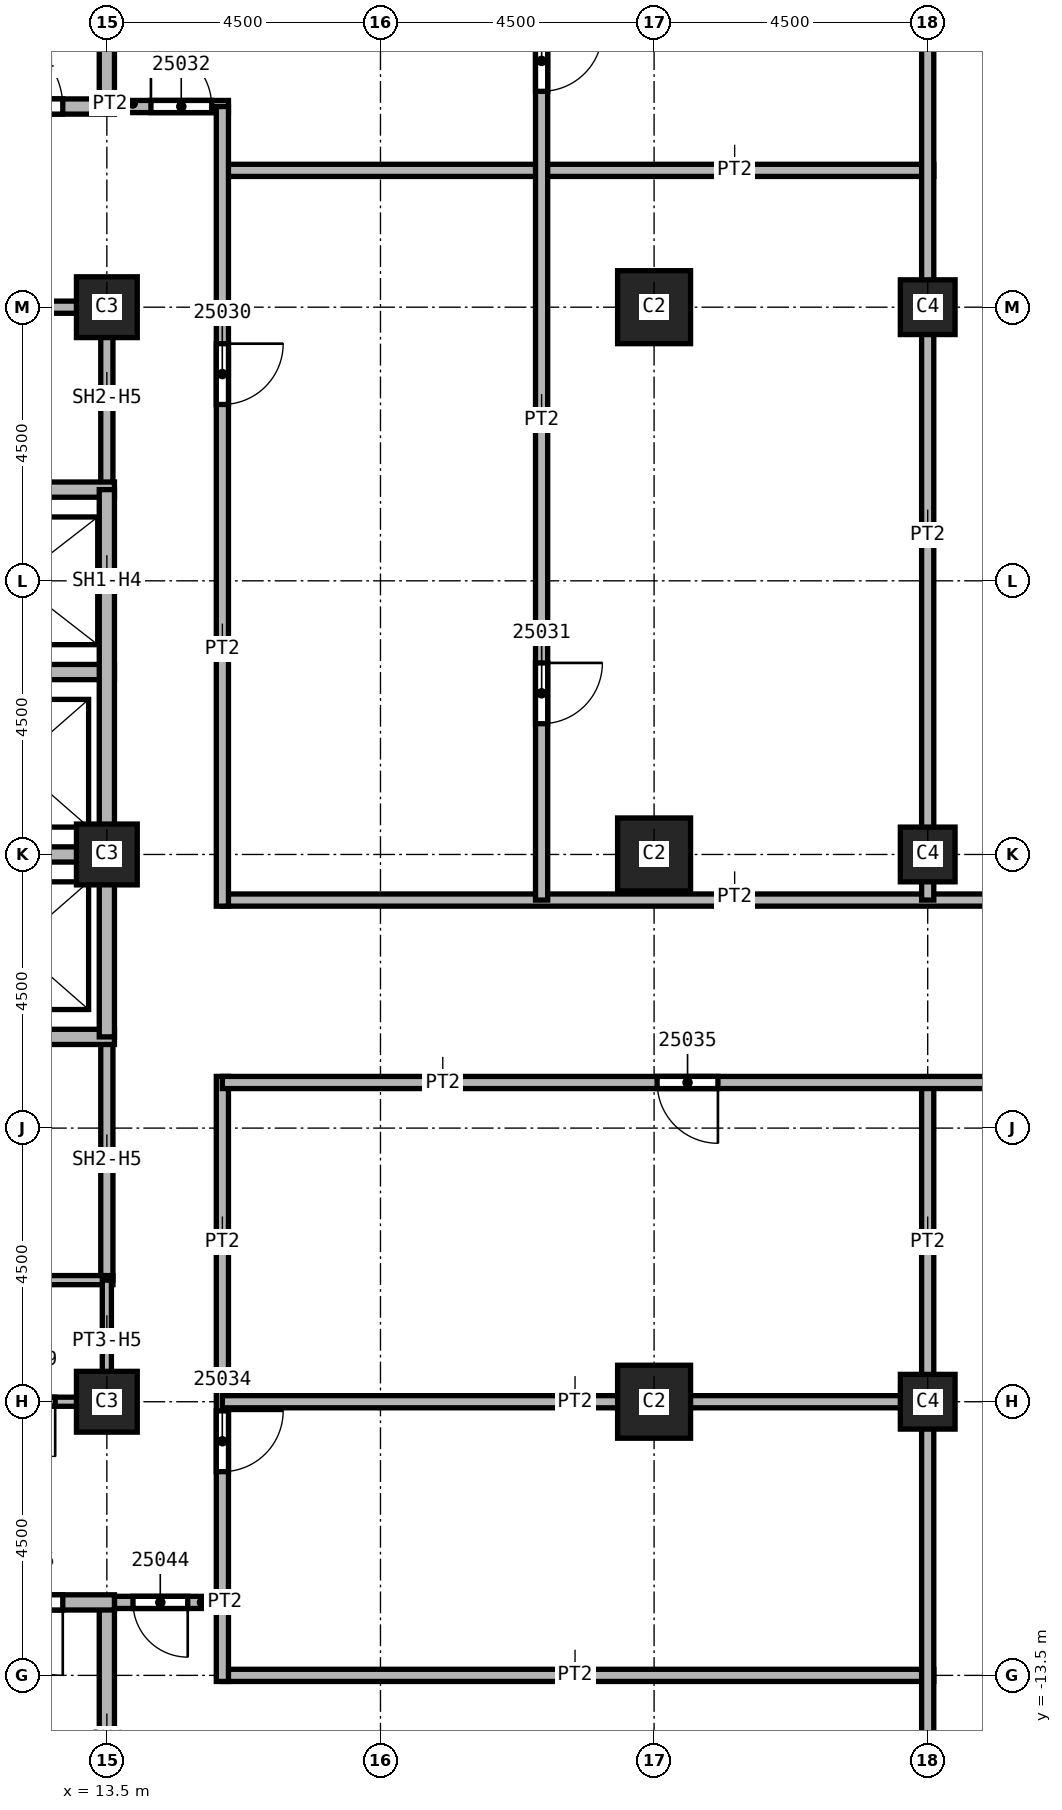
"""IFC4 building model, lengths in metres.
Left out: names, types, materials, properties, quantities, classifications, styles, units other than length and angle.
Written with IfcOpenShell. Run it as: python <this file> out.ifc"""

import sys

from ifc_helpers import new_model, si_unit, direction, frame, frame_2d, origin, origin_2d, place, context, subcontext, project, spatial, rectangle, extrude, element, fill, save


model = new_model("IFC4")
c1 = context("Model", 3, precision=1e-05, world=origin(), true_north=direction((0.0, 1.0)))
c2 = subcontext(c1, "Body", "Model", "MODEL_VIEW")
j1 = project(units=[si_unit("LENGTHUNIT", "METRE"), si_unit("PLANEANGLEUNIT", "RADIAN")], contexts=[c1])
p1 = place(None, origin())
s1 = spatial("IfcSite", under=j1, at=p1, CompositionType="ELEMENT")
p2 = place(p1, origin())
s2 = spatial("IfcBuilding", under=s1, at=p2, CompositionType="ELEMENT")
p3 = place(p2, frame((0.0, 0.0, 60.0)))
s3 = spatial("IfcBuildingStorey", under=s2, at=p3, CompositionType="ELEMENT", Elevation=60.0)
for number, where, z_axis, x_axis in (
    (1, (22.5, 0.0, 0.0), (0.0, 0.0, 1.0), (1.0, 0.0, 0.0)),
    (2, (22.5, 9.0, 0.0), (0.0, 0.0, 1.0), (1.0, 0.0, 0.0)),
    (3, (22.5, -9.0, 0.0), (0.0, 0.0, 1.0), (1.0, 0.0, 0.0)),
):
    element("IfcColumn", number, at=place(p3, frame(where, z_axis=z_axis, x_axis=x_axis)), inside=s3, PredefinedType="COLUMN", context=c2, shape_type="SweptSolid", body=[
        extrude(rectangle(XDim=1.2, YDim=1.2, at=origin_2d()), origin(), (0.0, 0.0, 1.0), 7.7),
    ])
for number, where, z_axis, x_axis in (
    (4, (13.5, 0.0, 0.0), (0.0, 0.0, 1.0), (1.0, 0.0, 0.0)),
    (5, (13.5, 9.0, 0.0), (0.0, 0.0, 1.0), (1.0, 0.0, 0.0)),
    (6, (13.5, -9.0, 0.0), (0.0, 0.0, 1.0), (1.0, 0.0, 0.0)),
):
    element("IfcColumn", number, at=place(p3, frame(where, z_axis=z_axis, x_axis=x_axis)), inside=s3, PredefinedType="COLUMN", context=c2, shape_type="SweptSolid", body=[
        extrude(rectangle(XDim=1.0, YDim=1.0, at=origin_2d()), origin(), (0.0, 0.0, 1.0), 7.7),
    ])
for number, where, z_axis, x_axis in (
    (7, (27.0, 0.0, 0.0), (0.0, 0.0, 1.0), (1.0, 0.0, 0.0)),
    (8, (27.0, 9.0, 0.0), (0.0, 0.0, 1.0), (1.0, 0.0, 0.0)),
    (9, (27.0, -9.0, 0.0), (0.0, 0.0, 1.0), (1.0, 0.0, 0.0)),
):
    element("IfcColumn", number, at=place(p3, frame(where, z_axis=z_axis, x_axis=x_axis)), inside=s3, PredefinedType="COLUMN", context=c2, shape_type="SweptSolid", body=[
        extrude(rectangle(XDim=0.9, YDim=0.9, at=origin_2d()), origin(), (0.0, 0.0, 1.0), 7.7),
    ])
p4 = place(p3, frame((13.375, 12.3, 0.0), z_axis=(0.0, 0.0, 1.0), x_axis=(1.0, 0.0, 0.0)))
e10 = element("IfcWall", 10, at=p4, inside=s3, PredefinedType="PARTITIONING", context=c2, shape_type="SweptSolid", body=[
    extrude(rectangle(XDim=2.125, YDim=0.2, at=frame_2d((1.062, 0.0))), origin(), (0.0, 0.0, 1.0), 7.7),
])
p5 = place(p4, frame((0.85, 0.0, 0.0)))
e11 = element("IfcOpeningElement", 11, at=p5, cuts=e10, PredefinedType="OPENING", context=c2, shape_type="SweptSolid", body=[
    extrude(rectangle(XDim=1.0, YDim=2.1, at=frame_2d((0.5, 1.05))), frame((0.0, 0.1, 0.0), z_axis=(0.0, -1.0, 0.0), x_axis=(1.0, 0.0, 0.0)), (0.0, 0.0, 1.0), 0.2),
])
p6 = place(p3, frame((15.4, -13.5, 0.0), z_axis=(0.0, 0.0, 1.0), x_axis=(1.0, 0.0, 0.0)))
e12 = element("IfcWall", 12, at=p6, inside=s3, PredefinedType="PARTITIONING", context=c2, shape_type="SweptSolid", body=[
    extrude(rectangle(XDim=11.7, YDim=0.2, at=frame_2d((5.85, 0.0))), origin(), (0.0, 0.0, 1.0), 7.7),
])
p7 = place(p3, frame((15.4, -3.65, 0.0), z_axis=(0.0, 0.0, 1.0), x_axis=(0.0, -1.0, 0.0)))
e13 = element("IfcWall", 13, at=p7, inside=s3, PredefinedType="PARTITIONING", context=c2, shape_type="SweptSolid", body=[
    extrude(rectangle(XDim=9.95, YDim=0.2, at=frame_2d((4.975, 0.0))), origin(), (0.0, 0.0, 1.0), 7.7),
])
p8 = place(p7, frame((5.5, 0.0, 0.0)))
e14 = element("IfcOpeningElement", 14, at=p8, cuts=e13, PredefinedType="OPENING", context=c2, shape_type="SweptSolid", body=[
    extrude(rectangle(XDim=1.0, YDim=2.1, at=frame_2d((0.5, 1.05))), frame((0.0, 0.1, 0.0), z_axis=(0.0, -1.0, 0.0), x_axis=(1.0, 0.0, 0.0)), (0.0, 0.0, 1.0), 0.2),
])
p9 = place(p3, frame((15.4, -9.0, 0.0), z_axis=(0.0, 0.0, 1.0), x_axis=(1.0, 0.0, 0.0)))
e15 = element("IfcWall", 15, at=p9, inside=s3, PredefinedType="PARTITIONING", context=c2, shape_type="SweptSolid", body=[
    extrude(rectangle(XDim=11.7, YDim=0.2, at=frame_2d((5.85, 0.0))), origin(), (0.0, 0.0, 1.0), 7.7),
])
p10 = place(p3, frame((15.4, -0.75, 0.0), z_axis=(0.0, 0.0, 1.0), x_axis=(1.0, 0.0, 0.0)))
e16 = element("IfcWall", 16, at=p10, inside=s3, PredefinedType="PARTITIONING", context=c2, shape_type="SweptSolid", body=[
    extrude(rectangle(XDim=20.725, YDim=0.2, at=frame_2d((10.363, 0.0))), origin(), (0.0, 0.0, 1.0), 7.7),
])
p11 = place(p10, frame((12.65, 0.0, 0.0)))
e17 = element("IfcOpeningElement", 17, at=p11, cuts=e16, PredefinedType="OPENING", context=c2, shape_type="SweptSolid", body=[
    extrude(rectangle(XDim=1.0, YDim=2.1, at=frame_2d((0.5, 1.05))), frame((0.0, 0.1, 0.0), z_axis=(0.0, -1.0, 0.0), x_axis=(1.0, 0.0, 0.0)), (0.0, 0.0, 1.0), 0.2),
])
p12 = place(p10, frame((16.7, 0.0, 0.0)))
e18 = element("IfcOpeningElement", 18, at=p12, cuts=e16, PredefinedType="OPENING", context=c2, shape_type="SweptSolid", body=[
    extrude(rectangle(XDim=1.0, YDim=2.1, at=frame_2d((0.5, 1.05))), frame((0.0, 0.1, 0.0), z_axis=(0.0, -1.0, 0.0), x_axis=(1.0, 0.0, 0.0)), (0.0, 0.0, 1.0), 0.2),
])
p13 = place(p3, frame((15.4, 11.25, 0.0), z_axis=(0.0, 0.0, 1.0), x_axis=(1.0, 0.0, 0.0)))
e19 = element("IfcWall", 19, at=p13, inside=s3, PredefinedType="PARTITIONING", context=c2, shape_type="SweptSolid", body=[
    extrude(rectangle(XDim=11.7, YDim=0.2, at=frame_2d((5.85, 0.0))), origin(), (0.0, 0.0, 1.0), 7.7),
])
p14 = place(p3, frame((15.4, 12.3, 0.0), z_axis=(0.0, 0.0, 1.0), x_axis=(0.0, -1.0, 0.0)))
e20 = element("IfcWall", 20, at=p14, inside=s3, PredefinedType="PARTITIONING", context=c2, shape_type="SweptSolid", body=[
    extrude(rectangle(XDim=13.15, YDim=0.2, at=frame_2d((6.575, 0.0))), origin(), (0.0, 0.0, 1.0), 7.7),
])
p15 = place(p14, frame((3.9, 0.0, 0.0)))
e21 = element("IfcOpeningElement", 21, at=p15, cuts=e20, PredefinedType="OPENING", context=c2, shape_type="SweptSolid", body=[
    extrude(rectangle(XDim=1.0, YDim=2.1, at=frame_2d((0.5, 1.05))), frame((0.0, 0.1, 0.0), z_axis=(0.0, -1.0, 0.0), x_axis=(1.0, 0.0, 0.0)), (0.0, 0.0, 1.0), 0.2),
])
p16 = place(p3, frame((15.5, -12.3, 0.0), z_axis=(0.0, 0.0, 1.0), x_axis=(-1.0, 0.0, 0.0)))
e22 = element("IfcWall", 22, at=p16, inside=s3, PredefinedType="PARTITIONING", context=c2, shape_type="SweptSolid", body=[
    extrude(rectangle(XDim=2.125, YDim=0.2, at=frame_2d((1.062, 0.0))), origin(), (0.0, 0.0, 1.0), 7.7),
])
p17 = place(p16, frame((0.67, 0.0, 0.0)))
e23 = element("IfcOpeningElement", 23, at=p17, cuts=e22, PredefinedType="OPENING", context=c2, shape_type="SweptSolid", body=[
    extrude(rectangle(XDim=0.9, YDim=2.1, at=frame_2d((0.45, 1.05))), frame((0.0, 0.1, 0.0), z_axis=(0.0, -1.0, 0.0), x_axis=(1.0, 0.0, 0.0)), (0.0, 0.0, 1.0), 0.2),
])
p18 = place(p3, frame((20.65, 16.8, 0.0), z_axis=(0.0, 0.0, 1.0), x_axis=(0.0, -1.0, 0.0)))
e24 = element("IfcWall", 24, at=p18, inside=s3, PredefinedType="PARTITIONING", context=c2, shape_type="SweptSolid", body=[
    extrude(rectangle(XDim=17.55, YDim=0.2, at=frame_2d((8.775, 0.0))), origin(), (0.0, 0.0, 1.0), 7.7),
])
p19 = place(p18, frame((13.65, 0.0, 0.0)))
e25 = element("IfcOpeningElement", 25, at=p19, cuts=e24, PredefinedType="OPENING", context=c2, shape_type="SweptSolid", body=[
    extrude(rectangle(XDim=1.0, YDim=2.1, at=frame_2d((0.5, 1.05))), frame((0.0, 0.1, 0.0), z_axis=(0.0, -1.0, 0.0), x_axis=(1.0, 0.0, 0.0)), (0.0, 0.0, 1.0), 0.2),
])
p20 = place(p18, frame((3.25, 0.0, 0.0)))
e26 = element("IfcOpeningElement", 26, at=p20, cuts=e24, PredefinedType="OPENING", context=c2, shape_type="SweptSolid", body=[
    extrude(rectangle(XDim=1.0, YDim=2.1, at=frame_2d((0.5, 1.05))), frame((0.0, 0.1, 0.0), z_axis=(0.0, -1.0, 0.0), x_axis=(1.0, 0.0, 0.0)), (0.0, 0.0, 1.0), 0.2),
])
p21 = place(p3, frame((27.0, -3.75, 0.0), z_axis=(0.0, 0.0, 1.0), x_axis=(0.0, -1.0, 0.0)))
e27 = element("IfcWall", 27, at=p21, inside=s3, PredefinedType="PARTITIONING", context=c2, shape_type="SweptSolid", body=[
    extrude(rectangle(XDim=12.0, YDim=0.2, at=frame_2d((6.0, 0.0))), origin(), (0.0, 0.0, 1.0), 7.7),
])
p22 = place(p3, frame((27.0, 15.9, 0.0), z_axis=(0.0, 0.0, 1.0), x_axis=(0.0, -1.0, 0.0)))
e28 = element("IfcWall", 28, at=p22, inside=s3, PredefinedType="PARTITIONING", context=c2, shape_type="SweptSolid", body=[
    extrude(rectangle(XDim=16.65, YDim=0.2, at=frame_2d((8.325, 0.0))), origin(), (0.0, 0.0, 1.0), 7.7),
])
p23 = place(p3, frame((36.125, -3.75, 0.0), z_axis=(0.0, 0.0, 1.0), x_axis=(-1.0, 0.0, 0.0)))
e29 = element("IfcWall", 29, at=p23, inside=s3, PredefinedType="PARTITIONING", context=c2, shape_type="SweptSolid", body=[
    extrude(rectangle(XDim=20.725, YDim=0.2, at=frame_2d((10.363, 0.0))), origin(), (0.0, 0.0, 1.0), 7.7),
])
p24 = place(p23, frame((12.575, 0.0, 0.0)))
e30 = element("IfcOpeningElement", 30, at=p24, cuts=e29, PredefinedType="OPENING", context=c2, shape_type="SweptSolid", body=[
    extrude(rectangle(XDim=1.0, YDim=2.1, at=frame_2d((0.5, 1.05))), frame((0.0, 0.1, 0.0), z_axis=(0.0, -1.0, 0.0), x_axis=(1.0, 0.0, 0.0)), (0.0, 0.0, 1.0), 0.2),
])
p25 = place(p23, frame((5.525, 0.0, 0.0)))
e31 = element("IfcOpeningElement", 31, at=p25, cuts=e29, PredefinedType="OPENING", context=c2, shape_type="SweptSolid", body=[
    extrude(rectangle(XDim=1.0, YDim=2.1, at=frame_2d((0.5, 1.05))), frame((0.0, 0.1, 0.0), z_axis=(0.0, -1.0, 0.0), x_axis=(1.0, 0.0, 0.0)), (0.0, 0.0, 1.0), 0.2),
])
p26 = place(p23, frame((0.25, 0.0, 0.0)))
e32 = element("IfcOpeningElement", 32, at=p26, cuts=e29, PredefinedType="OPENING", context=c2, shape_type="SweptSolid", body=[
    extrude(rectangle(XDim=1.0, YDim=2.1, at=frame_2d((0.5, 1.05))), frame((0.0, 0.1, 0.0), z_axis=(0.0, -1.0, 0.0), x_axis=(1.0, 0.0, 0.0)), (0.0, 0.0, 1.0), 0.2),
])
p27 = place(p3, frame((10.5, 9.0, 0.0), z_axis=(0.0, 0.0, 1.0), x_axis=(1.0, 0.0, 0.0)))
e33 = element("IfcWall", 33, at=p27, inside=s3, PredefinedType="SOLIDWALL", context=c2, shape_type="SweptSolid", body=[
    extrude(rectangle(XDim=3.0, YDim=0.2, at=frame_2d((1.5, 0.0))), origin(), (0.0, 0.0, 1.0), 6.938),
])
p28 = place(p3, frame((13.5, -3.0, 0.0), z_axis=(0.0, 0.0, 1.0), x_axis=(0.0, -1.0, 0.0)))
e34 = element("IfcWall", 34, at=p28, inside=s3, PredefinedType="SOLIDWALL", context=c2, shape_type="SweptSolid", body=[
    extrude(rectangle(XDim=4.0, YDim=0.2, at=frame_2d((2.0, 0.0))), origin(), (0.0, 0.0, 1.0), 6.938),
])
p29 = place(p3, frame((13.5, 9.1, 0.0), z_axis=(0.0, 0.0, 1.0), x_axis=(0.0, -1.0, 0.0)))
e35 = element("IfcWall", 35, at=p29, inside=s3, PredefinedType="SOLIDWALL", context=c2, shape_type="SweptSolid", body=[
    extrude(rectangle(XDim=3.1, YDim=0.2, at=frame_2d((1.55, 0.0))), origin(), (0.0, 0.0, 1.0), 6.938),
])
p30 = place(p3, frame((4.375, 3.0, 0.0), z_axis=(0.0, 0.0, 1.0), x_axis=(1.0, 0.0, 0.0)))
e36 = element("IfcWall", 36, at=p30, inside=s3, PredefinedType="SOLIDWALL", context=c2, shape_type="SweptSolid", body=[
    extrude(rectangle(XDim=9.25, YDim=0.25, at=frame_2d((4.625, 0.0))), origin(), (0.0, 0.0, 1.0), 7.7),
])
p31 = place(p30, frame((4.875, 0.0, 0.0)))
e37 = element("IfcOpeningElement", 37, at=p31, cuts=e36, PredefinedType="OPENING", context=c2, shape_type="SweptSolid", body=[
    extrude(rectangle(XDim=1.1, YDim=2.1, at=frame_2d((0.55, 1.05))), frame((0.0, 0.125, 0.0), z_axis=(0.0, -1.0, 0.0), x_axis=(1.0, 0.0, 0.0)), (0.0, 0.0, 1.0), 0.25),
])
p32 = place(p3, frame((7.5, -3.0, 0.0), z_axis=(0.0, 0.0, 1.0), x_axis=(1.0, 0.0, 0.0)))
e38 = element("IfcWall", 38, at=p32, inside=s3, PredefinedType="SOLIDWALL", context=c2, shape_type="SweptSolid", body=[
    extrude(rectangle(XDim=6.125, YDim=0.25, at=frame_2d((3.062, 0.0))), origin(), (0.0, 0.0, 1.0), 7.7),
])
p33 = place(p32, frame((1.75, 0.0, 0.0)))
e39 = element("IfcOpeningElement", 39, at=p33, cuts=e38, PredefinedType="OPENING", context=c2, shape_type="SweptSolid", body=[
    extrude(rectangle(XDim=1.1, YDim=2.1, at=frame_2d((0.55, 1.05))), frame((0.0, 0.125, 0.0), z_axis=(0.0, -1.0, 0.0), x_axis=(1.0, 0.0, 0.0)), (0.0, 0.0, 1.0), 0.25),
])
for number, where, z_axis, x_axis in (
    (40, (10.5, 0.0, 0.0), (0.0, 0.0, 1.0), (1.0, 0.0, 0.0)),
    (41, (10.5, 6.0, 0.0), (0.0, 0.0, 1.0), (1.0, 0.0, 0.0)),
):
    element("IfcWall", number, at=place(p3, frame(where, z_axis=z_axis, x_axis=x_axis)), inside=s3, PredefinedType="SOLIDWALL", context=c2, shape_type="SweptSolid", body=[
        extrude(rectangle(XDim=3.125, YDim=0.25, at=frame_2d((1.562, 0.0))), origin(), (0.0, 0.0, 1.0), 7.7),
    ])
p34 = place(p3, frame((13.5, 6.0, 0.0), z_axis=(0.0, 0.0, 1.0), x_axis=(0.0, -1.0, 0.0)))
e42 = element("IfcWall", 42, at=p34, inside=s3, PredefinedType="SOLIDWALL", context=c2, shape_type="SweptSolid", body=[
    extrude(rectangle(XDim=9.0, YDim=0.25, at=frame_2d((4.5, 0.0))), origin(), (0.0, 0.0, 1.0), 6.938),
])
p35 = place(p3, frame((4.375, 12.3, 0.0), z_axis=(0.0, 0.0, 1.0), x_axis=(1.0, 0.0, 0.0)))
e43 = element("IfcWall", 43, at=p35, inside=s3, PredefinedType="SOLIDWALL", context=c2, shape_type="SweptSolid", body=[
    extrude(rectangle(XDim=9.25, YDim=0.25, at=frame_2d((4.625, 0.0))), origin(), (0.0, 0.0, 1.0), 7.7),
])
p36 = place(p35, frame((7.2, 0.0, 0.0)))
e44 = element("IfcOpeningElement", 44, at=p36, cuts=e43, PredefinedType="OPENING", context=c2, shape_type="SweptSolid", body=[
    extrude(rectangle(XDim=1.2, YDim=2.1, at=frame_2d((0.6, 1.05))), frame((0.0, 0.125, 0.0), z_axis=(0.0, -1.0, 0.0), x_axis=(1.0, 0.0, 0.0)), (0.0, 0.0, 1.0), 0.25),
])
for number, where, z_axis, x_axis in (
    (45, (13.5, -12.3, 0.0), (0.0, 0.0, 1.0), (0.0, -1.0, 0.0)),
    (46, (13.5, 16.925, 0.0), (0.0, 0.0, 1.0), (0.0, -1.0, 0.0)),
):
    element("IfcWall", number, at=place(p3, frame(where, z_axis=z_axis, x_axis=x_axis)), inside=s3, PredefinedType="SOLIDWALL", context=c2, shape_type="SweptSolid", body=[
        extrude(rectangle(XDim=4.625, YDim=0.25, at=frame_2d((2.312, 0.0))), origin(), (0.0, 0.0, 1.0), 7.7),
    ])
p37 = place(p3, frame((13.625, -12.3, 0.0), z_axis=(0.0, 0.0, 1.0), x_axis=(-1.0, 0.0, 0.0)))
e47 = element("IfcWall", 47, at=p37, inside=s3, PredefinedType="SOLIDWALL", context=c2, shape_type="SweptSolid", body=[
    extrude(rectangle(XDim=9.25, YDim=0.25, at=frame_2d((4.625, 0.0))), origin(), (0.0, 0.0, 1.0), 7.7),
])
p38 = place(p37, frame((0.85, 0.0, 0.0)))
e48 = element("IfcOpeningElement", 48, at=p38, cuts=e47, PredefinedType="OPENING", context=c2, shape_type="SweptSolid", body=[
    extrude(rectangle(XDim=1.2, YDim=2.1, at=frame_2d((0.6, 1.05))), frame((0.0, 0.125, 0.0), z_axis=(0.0, -1.0, 0.0), x_axis=(1.0, 0.0, 0.0)), (0.0, 0.0, 1.0), 0.25),
])
p39 = place(p3, frame((10.5, -7.0, 0.0), z_axis=(0.0, 0.0, 1.0), x_axis=(1.0, 0.0, 0.0)))
e49 = element("IfcWall", 49, at=p39, inside=s3, PredefinedType="PARTITIONING", context=c2, shape_type="SweptSolid", body=[
    extrude(rectangle(XDim=3.1, YDim=0.15, at=frame_2d((1.55, 0.0))), origin(), (0.0, 0.0, 1.0), 7.7),
])
p40 = place(p3, frame((13.5, -9.0, 0.0), z_axis=(0.0, 0.0, 1.0), x_axis=(-1.0, 0.0, 0.0)))
e50 = element("IfcWall", 50, at=p40, inside=s3, PredefinedType="PARTITIONING", context=c2, shape_type="SweptSolid", body=[
    extrude(rectangle(XDim=3.0, YDim=0.15, at=frame_2d((1.5, 0.0))), origin(), (0.0, 0.0, 1.0), 6.938),
])
p41 = place(p40, frame((0.85, 0.0, 0.0)))
e51 = element("IfcOpeningElement", 51, at=p41, cuts=e50, PredefinedType="OPENING", context=c2, shape_type="SweptSolid", body=[
    extrude(rectangle(XDim=0.9, YDim=2.1, at=frame_2d((0.45, 1.05))), frame((0.0, 0.075, 0.0), z_axis=(0.0, -1.0, 0.0), x_axis=(1.0, 0.0, 0.0)), (0.0, 0.0, 1.0), 0.15),
])
p42 = place(p3, frame((13.5, -7.0, 0.0), z_axis=(0.0, 0.0, 1.0), x_axis=(0.0, -1.0, 0.0)))
e52 = element("IfcWall", 52, at=p42, inside=s3, PredefinedType="PARTITIONING", context=c2, shape_type="SweptSolid", body=[
    extrude(rectangle(XDim=2.075, YDim=0.15, at=frame_2d((1.038, 0.0))), origin(), (0.0, 0.0, 1.0), 6.938),
])
p43 = place(p41, origin())
e53 = element("IfcDoor", 53, at=p43, inside=s3, OperationType="SINGLE_SWING_RIGHT", PredefinedType="DOOR", context=c2, shape_type="SweptSolid", body=[
    extrude(rectangle(XDim=0.9, YDim=2.1, at=frame_2d((0.45, 1.05))), frame((0.0, 0.025, 0.0), z_axis=(0.0, -1.0, 0.0), x_axis=(1.0, 0.0, 0.0)), (0.0, 0.0, 1.0), 0.05),
])
fill(e51, e53)
p44 = place(p36, origin())
e54 = element("IfcDoor", 54, at=p44, inside=s3, OperationType="SINGLE_SWING_LEFT", PredefinedType="DOOR", context=c2, shape_type="SweptSolid", body=[
    extrude(rectangle(XDim=1.2, YDim=2.1, at=frame_2d((0.6, 1.05))), frame((0.0, 0.025, 0.0), z_axis=(0.0, -1.0, 0.0), x_axis=(1.0, 0.0, 0.0)), (0.0, 0.0, 1.0), 0.05),
])
fill(e44, e54)
p45 = place(p38, origin())
e55 = element("IfcDoor", 55, at=p45, inside=s3, OperationType="SINGLE_SWING_RIGHT", PredefinedType="DOOR", context=c2, shape_type="SweptSolid", body=[
    extrude(rectangle(XDim=1.2, YDim=2.1, at=frame_2d((0.6, 1.05))), frame((0.0, 0.025, 0.0), z_axis=(0.0, -1.0, 0.0), x_axis=(1.0, 0.0, 0.0)), (0.0, 0.0, 1.0), 0.05),
])
fill(e48, e55)
p46 = place(p15, origin())
e56 = element("IfcDoor", 56, at=p46, inside=s3, OperationType="SINGLE_SWING_LEFT", PredefinedType="DOOR", context=c2, shape_type="SweptSolid", body=[
    extrude(rectangle(XDim=1.0, YDim=2.1, at=frame_2d((0.5, 1.05))), frame((0.0, 0.025, 0.0), z_axis=(0.0, -1.0, 0.0), x_axis=(1.0, 0.0, 0.0)), (0.0, 0.0, 1.0), 0.05),
])
fill(e21, e56)
p47 = place(p19, origin())
e57 = element("IfcDoor", 57, at=p47, inside=s3, OperationType="SINGLE_SWING_RIGHT", PredefinedType="DOOR", context=c2, shape_type="SweptSolid", body=[
    extrude(rectangle(XDim=1.0, YDim=2.1, at=frame_2d((0.5, 1.05))), frame((0.0, 0.025, 0.0), z_axis=(0.0, -1.0, 0.0), x_axis=(1.0, 0.0, 0.0)), (0.0, 0.0, 1.0), 0.05),
])
fill(e25, e57)
p48 = place(p5, origin())
e58 = element("IfcDoor", 58, at=p48, inside=s3, OperationType="SINGLE_SWING_LEFT", PredefinedType="DOOR", context=c2, shape_type="SweptSolid", body=[
    extrude(rectangle(XDim=1.0, YDim=2.1, at=frame_2d((0.5, 1.05))), frame((0.0, 0.025, 0.0), z_axis=(0.0, -1.0, 0.0), x_axis=(1.0, 0.0, 0.0)), (0.0, 0.0, 1.0), 0.05),
])
fill(e11, e58)
p49 = place(p20, origin())
e59 = element("IfcDoor", 59, at=p49, inside=s3, OperationType="SINGLE_SWING_RIGHT", PredefinedType="DOOR", context=c2, shape_type="SweptSolid", body=[
    extrude(rectangle(XDim=1.0, YDim=2.1, at=frame_2d((0.5, 1.05))), frame((0.0, 0.025, 0.0), z_axis=(0.0, -1.0, 0.0), x_axis=(1.0, 0.0, 0.0)), (0.0, 0.0, 1.0), 0.05),
])
fill(e26, e59)
p50 = place(p8, origin())
e60 = element("IfcDoor", 60, at=p50, inside=s3, OperationType="SINGLE_SWING_LEFT", PredefinedType="DOOR", context=c2, shape_type="SweptSolid", body=[
    extrude(rectangle(XDim=1.0, YDim=2.1, at=frame_2d((0.5, 1.05))), frame((0.0, 0.025, 0.0), z_axis=(0.0, -1.0, 0.0), x_axis=(1.0, 0.0, 0.0)), (0.0, 0.0, 1.0), 0.05),
])
fill(e14, e60)
p51 = place(p24, origin())
e61 = element("IfcDoor", 61, at=p51, inside=s3, OperationType="SINGLE_SWING_RIGHT", PredefinedType="DOOR", context=c2, shape_type="SweptSolid", body=[
    extrude(rectangle(XDim=1.0, YDim=2.1, at=frame_2d((0.5, 1.05))), frame((0.0, 0.025, 0.0), z_axis=(0.0, -1.0, 0.0), x_axis=(1.0, 0.0, 0.0)), (0.0, 0.0, 1.0), 0.05),
])
fill(e30, e61)
p52 = place(p17, origin())
e62 = element("IfcDoor", 62, at=p52, inside=s3, OperationType="SINGLE_SWING_LEFT", PredefinedType="DOOR", context=c2, shape_type="SweptSolid", body=[
    extrude(rectangle(XDim=0.9, YDim=2.1, at=frame_2d((0.45, 1.05))), frame((0.0, 0.025, 0.0), z_axis=(0.0, -1.0, 0.0), x_axis=(1.0, 0.0, 0.0)), (0.0, 0.0, 1.0), 0.05),
])
fill(e23, e62)
save(model, sys.argv[1])
